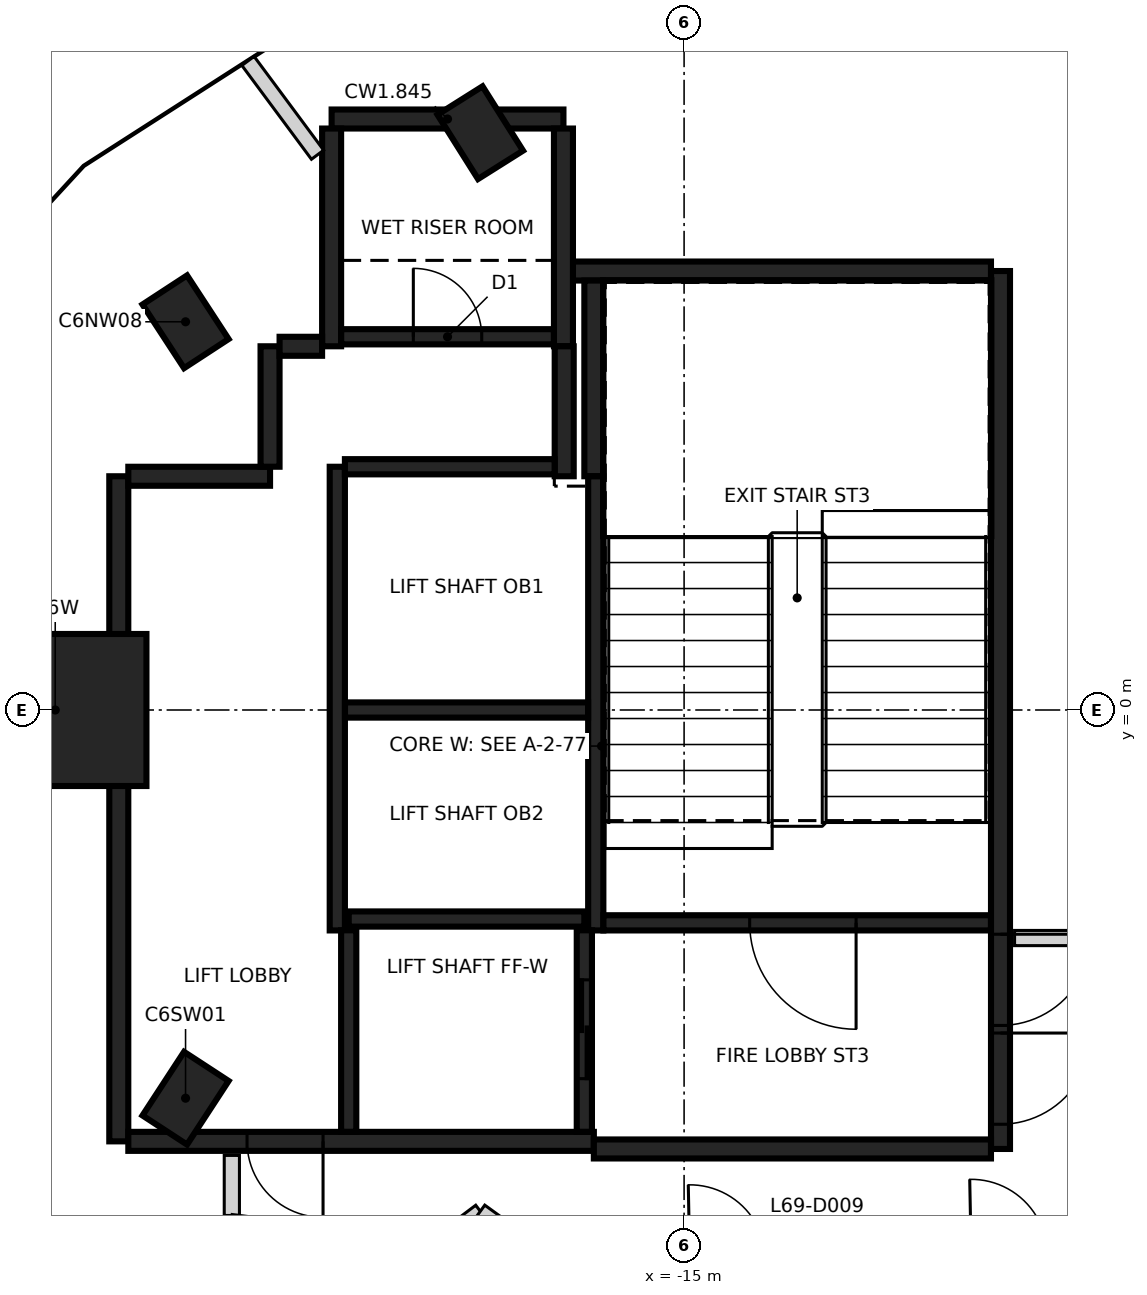
"""IFC4 building model, lengths in metres.
Left out: names, types, materials, properties, quantities, classifications, styles, units other than length and angle.
Written with IfcOpenShell. Run it as: python <this file> out.ifc"""

import sys

from ifc_helpers import new_model, si_unit, direction, frame, frame_2d, origin, origin_2d, place, context, subcontext, project, spatial, rectangle, extrude, element, fill, save


model = new_model("IFC4")
c1 = context("Model", 3, precision=1e-05, world=origin(), true_north=direction((0.0, 1.0)))
c2 = subcontext(c1, "Body", "Model", "MODEL_VIEW")
j1 = project(units=[si_unit("LENGTHUNIT", "METRE"), si_unit("PLANEANGLEUNIT", "RADIAN")], contexts=[c1])
p1 = place(None, origin())
s1 = spatial("IfcSite", under=j1, at=p1, CompositionType="ELEMENT")
p2 = place(p1, origin())
s2 = spatial("IfcBuilding", under=s1, at=p2, CompositionType="ELEMENT")
p3 = place(p2, frame((0.0, 0.0, 273.0)))
s3 = spatial("IfcBuildingStorey", under=s2, at=p3, CompositionType="ELEMENT", Elevation=273.0)
for number, where, z_axis, x_axis in (
    (1, (-17.681, 7.595, -0.35), (0.0, 0.0, 1.0), (-0.533, 0.846, 0.0)),
    (2, (-21.559, 5.107, -0.35), (0.0, 0.0, 1.0), (-0.547, 0.837, 0.0)),
    (3, (-21.559, -5.107, -0.35), (0.0, 0.0, 1.0), (0.547, 0.837, 0.0)),
):
    element("IfcColumn", number, at=place(p3, frame(where, z_axis=z_axis, x_axis=x_axis)), inside=s3, PredefinedType="COLUMN", context=c2, shape_type="SweptSolid", body=[
        extrude(rectangle(XDim=1.0, YDim=0.7, at=origin_2d()), origin(), (0.0, 0.0, 1.0), 3.6),
    ])
p4 = place(p3, frame((-23.273, 0.0, -0.35), z_axis=(0.0, 0.0, 1.0), x_axis=(1.0, 0.0, 0.0)))
e4 = element("IfcColumn", 4, at=p4, inside=s3, PredefinedType="COLUMN", context=c2, shape_type="SweptSolid", body=[
    extrude(rectangle(XDim=2.4, YDim=2.0, at=origin_2d()), origin(), (0.0, 0.0, 1.0), 3.6),
])
p5 = place(p3, frame((-10.837, 5.775, 0.0), z_axis=(0.0, 0.0, 1.0), x_axis=(0.0, -1.0, 0.0)))
e5 = element("IfcWall", 5, at=p5, inside=s3, PredefinedType="SHEAR", context=c2, shape_type="SweptSolid", body=[
    extrude(rectangle(XDim=11.55, YDim=0.25, at=frame_2d((5.775, 0.0))), origin(), (0.0, 0.0, 1.0), 3.25),
])
p6 = place(p5, frame((10.025, 0.0, 0.0)))
e6 = element("IfcOpeningElement", 6, at=p6, cuts=e5, PredefinedType="OPENING", context=c2, shape_type="SweptSolid", body=[
    extrude(rectangle(XDim=1.2, YDim=2.1, at=frame_2d((0.6, 1.05))), frame((0.0, 0.135, 0.0), z_axis=(0.0, -1.0, 0.0), x_axis=(1.0, 0.0, 0.0)), (0.0, 0.0, 1.0), 0.27),
])
p7 = place(p5, frame((8.725, 0.0, 0.0)))
e7 = element("IfcOpeningElement", 7, at=p7, cuts=e5, PredefinedType="OPENING", context=c2, shape_type="SweptSolid", body=[
    extrude(rectangle(XDim=1.2, YDim=2.1, at=frame_2d((0.6, 1.05))), frame((0.0, 0.135, 0.0), z_axis=(0.0, -1.0, 0.0), x_axis=(1.0, 0.0, 0.0)), (0.0, 0.0, 1.0), 0.27),
])
p8 = place(p3, frame((-22.437, -5.675, 0.0), z_axis=(0.0, 0.0, 1.0), x_axis=(0.0, 1.0, 0.0)))
e8 = element("IfcWall", 8, at=p8, inside=s3, PredefinedType="SHEAR", context=c2, shape_type="SweptSolid", body=[
    extrude(rectangle(XDim=8.75, YDim=0.25, at=frame_2d((4.375, 0.0))), origin(), (0.0, 0.0, 1.0), 3.25),
])
p9 = place(p3, frame((-16.187, -5.675, 0.0), z_axis=(0.0, 0.0, 1.0), x_axis=(-1.0, 0.0, 0.0)))
e9 = element("IfcWall", 9, at=p9, inside=s3, PredefinedType="SHEAR", context=c2, shape_type="SweptSolid", body=[
    extrude(rectangle(XDim=6.125, YDim=0.25, at=frame_2d((3.062, 0.0))), origin(), (0.0, 0.0, 1.0), 3.25),
])
p10 = place(p9, frame((3.563, 0.0, 0.0)))
e10 = element("IfcOpeningElement", 10, at=p10, cuts=e9, PredefinedType="OPENING", context=c2, shape_type="SweptSolid", body=[
    extrude(rectangle(XDim=1.0, YDim=2.1, at=frame_2d((0.5, 1.05))), frame((0.0, 0.135, 0.0), z_axis=(0.0, -1.0, 0.0), x_axis=(1.0, 0.0, 0.0)), (0.0, 0.0, 1.0), 0.27),
])
p11 = place(p3, frame((-10.963, -5.775, 0.0), z_axis=(0.0, 0.0, 1.0), x_axis=(-1.0, 0.0, 0.0)))
e11 = element("IfcWall", 11, at=p11, inside=s3, PredefinedType="SHEAR", context=c2, shape_type="SweptSolid", body=[
    extrude(rectangle(XDim=5.225, YDim=0.25, at=frame_2d((2.612, 0.0))), origin(), (0.0, 0.0, 1.0), 3.25),
])
p12 = place(p3, frame((-16.472, 5.775, 0.0), z_axis=(0.0, 0.0, 1.0), x_axis=(1.0, 0.0, 0.0)))
e12 = element("IfcWall", 12, at=p12, inside=s3, PredefinedType="SHEAR", context=c2, shape_type="SweptSolid", body=[
    extrude(rectangle(XDim=5.51, YDim=0.25, at=frame_2d((2.755, 0.0))), origin(), (0.0, 0.0, 1.0), 3.25),
])
p13 = place(p3, frame((-19.637, 7.775, 0.0), z_axis=(0.0, 0.0, 1.0), x_axis=(1.0, 0.0, 0.0)))
e13 = element("IfcWall", 13, at=p13, inside=s3, PredefinedType="SHEAR", context=c2, shape_type="SweptSolid", body=[
    extrude(rectangle(XDim=3.05, YDim=0.25, at=frame_2d((1.525, 0.0))), origin(), (0.0, 0.0, 1.0), 3.25),
])
for number, where, z_axis, x_axis in (
    (14, (-16.587, 7.65, 0.0), (0.0, 0.0, 1.0), (0.0, -1.0, 0.0)),
    (15, (-19.637, 4.785, 0.0), (0.0, 0.0, 1.0), (0.0, 1.0, 0.0)),
):
    element("IfcWall", number, at=place(p3, frame(where, z_axis=z_axis, x_axis=x_axis)), inside=s3, PredefinedType="SHEAR", context=c2, shape_type="SweptSolid", body=[
        extrude(rectangle(XDim=2.865, YDim=0.25, at=frame_2d((1.432, 0.0))), origin(), (0.0, 0.0, 1.0), 3.25),
    ])
p14 = place(p3, frame((-16.187, 3.075, 0.0), z_axis=(0.0, 0.0, 1.0), x_axis=(0.0, 1.0, 0.0)))
e16 = element("IfcWall", 16, at=p14, inside=s3, PredefinedType="SHEAR", context=c2, shape_type="SweptSolid", body=[
    extrude(rectangle(XDim=2.575, YDim=0.25, at=frame_2d((1.287, 0.0))), origin(), (0.0, 0.0, 1.0), 3.25),
])
p15 = place(p3, frame((-22.312, 3.075, 0.0), z_axis=(0.0, 0.0, 1.0), x_axis=(1.0, 0.0, 0.0)))
e17 = element("IfcWall", 17, at=p15, inside=s3, PredefinedType="SHEAR", context=c2, shape_type="SweptSolid", body=[
    extrude(rectangle(XDim=1.865, YDim=0.25, at=frame_2d((0.932, 0.0))), origin(), (0.0, 0.0, 1.0), 3.25),
])
p16 = place(p3, frame((-16.577, 4.785, 0.0), z_axis=(0.0, 0.0, 1.0), x_axis=(0.0, -1.0, 0.0)))
e18 = element("IfcWall", 18, at=p16, inside=s3, PredefinedType="SHEAR", context=c2, shape_type="SweptSolid", body=[
    extrude(rectangle(XDim=1.71, YDim=0.25, at=frame_2d((0.855, 0.0))), origin(), (0.0, 0.0, 1.0), 3.25),
])
p17 = place(p3, frame((-20.447, 3.2, 0.0), z_axis=(0.0, 0.0, 1.0), x_axis=(0.0, 1.0, 0.0)))
e19 = element("IfcWall", 19, at=p17, inside=s3, PredefinedType="SHEAR", context=c2, shape_type="SweptSolid", body=[
    extrude(rectangle(XDim=1.584, YDim=0.25, at=frame_2d((0.792, 0.0))), origin(), (0.0, 0.0, 1.0), 3.25),
])
p18 = place(p3, frame((-20.322, 4.785, 0.0), z_axis=(0.0, 0.0, 1.0), x_axis=(1.0, 0.0, 0.0)))
e20 = element("IfcWall", 20, at=p18, inside=s3, PredefinedType="SHEAR", context=c2, shape_type="SweptSolid", body=[
    extrude(rectangle(XDim=0.559, YDim=0.25, at=frame_2d((0.28, 0.0))), origin(), (0.0, 0.0, 1.0), 3.25),
])
p19 = place(p3, frame((-16.162, 3.074, 0.0), z_axis=(0.0, 0.0, 1.0), x_axis=(0.0, -1.0, 0.0)))
e21 = element("IfcWall", 21, at=p19, inside=s3, PredefinedType="SHEAR", context=c2, shape_type="SweptSolid", body=[
    extrude(rectangle(XDim=5.974, YDim=0.2, at=frame_2d((2.987, 0.0))), origin(), (0.0, 0.0, 1.0), 3.25),
])
p20 = place(p3, frame((-19.562, -2.9, 0.0), z_axis=(0.0, 0.0, 1.0), x_axis=(0.0, 1.0, 0.0)))
e22 = element("IfcWall", 22, at=p20, inside=s3, PredefinedType="SHEAR", context=c2, shape_type="SweptSolid", body=[
    extrude(rectangle(XDim=6.1, YDim=0.2, at=frame_2d((3.05, 0.0))), origin(), (0.0, 0.0, 1.0), 3.25),
])
p21 = place(p3, frame((-10.963, -2.8, 0.0), z_axis=(0.0, 0.0, 1.0), x_axis=(-1.0, 0.0, 0.0)))
e23 = element("IfcWall", 23, at=p21, inside=s3, PredefinedType="SHEAR", context=c2, shape_type="SweptSolid", body=[
    extrude(rectangle(XDim=5.098, YDim=0.2, at=frame_2d((2.549, 0.0))), origin(), (0.0, 0.0, 1.0), 3.25),
])
p22 = place(p21, frame((1.774, 0.0, 0.0)))
e24 = element("IfcOpeningElement", 24, at=p22, cuts=e23, PredefinedType="OPENING", context=c2, shape_type="SweptSolid", body=[
    extrude(rectangle(XDim=1.4, YDim=2.1, at=frame_2d((0.7, 1.05))), frame((0.0, 0.11, 0.0), z_axis=(0.0, -1.0, 0.0), x_axis=(1.0, 0.0, 0.0)), (0.0, 0.0, 1.0), 0.22),
])
p23 = place(p3, frame((-16.263, 0.0, 0.0), z_axis=(0.0, 0.0, 1.0), x_axis=(-1.0, 0.0, 0.0)))
e25 = element("IfcWall", 25, at=p23, inside=s3, PredefinedType="SHEAR", context=c2, shape_type="SweptSolid", body=[
    extrude(rectangle(XDim=3.198, YDim=0.2, at=frame_2d((1.599, 0.0))), origin(), (0.0, 0.0, 1.0), 3.25),
])
p24 = place(p3, frame((-19.511, 4.91, 0.0), z_axis=(0.0, 0.0, 1.0), x_axis=(1.0, 0.0, 0.0)))
e26 = element("IfcWall", 26, at=p24, inside=s3, PredefinedType="SHEAR", context=c2, shape_type="SweptSolid", body=[
    extrude(rectangle(XDim=2.798, YDim=0.2, at=frame_2d((1.399, 0.0))), origin(), (0.0, 0.0, 1.0), 3.25),
])
p25 = place(p24, frame((0.949, 0.0, 0.0)))
e27 = element("IfcOpeningElement", 27, at=p25, cuts=e26, PredefinedType="OPENING", context=c2, shape_type="SweptSolid", body=[
    extrude(rectangle(XDim=0.9, YDim=2.1, at=frame_2d((0.45, 1.05))), frame((0.0, 0.11, 0.0), z_axis=(0.0, -1.0, 0.0), x_axis=(1.0, 0.0, 0.0)), (0.0, 0.0, 1.0), 0.22),
])
p26 = place(p3, frame((-19.462, 3.2, 0.0), z_axis=(0.0, 0.0, 1.0), x_axis=(1.0, 0.0, 0.0)))
e28 = element("IfcWall", 28, at=p26, inside=s3, PredefinedType="SHEAR", context=c2, shape_type="SweptSolid", body=[
    extrude(rectangle(XDim=2.759, YDim=0.2, at=frame_2d((1.379, 0.0))), origin(), (0.0, 0.0, 1.0), 3.25),
])
p27 = place(p3, frame((-19.412, -2.75, 0.0), z_axis=(0.0, 0.0, 1.0), x_axis=(1.0, 0.0, 0.0)))
e29 = element("IfcWall", 29, at=p27, inside=s3, PredefinedType="SHEAR", context=c2, shape_type="SweptSolid", body=[
    extrude(rectangle(XDim=3.1, YDim=0.2, at=frame_2d((1.55, 0.0))), origin(), (0.0, 0.0, 1.0), 3.25),
])
p28 = place(p3, frame((-16.312, -2.898, 0.0), z_axis=(0.0, 0.0, 1.0), x_axis=(0.0, -1.0, 0.0)))
e30 = element("IfcWall", 30, at=p28, inside=s3, PredefinedType="SHEAR", context=c2, shape_type="SweptSolid", body=[
    extrude(rectangle(XDim=2.651, YDim=0.2, at=frame_2d((1.325, 0.0))), origin(), (0.0, 0.0, 1.0), 3.25),
])
p29 = place(p28, frame((0.652, 0.0, 0.0)))
e31 = element("IfcOpeningElement", 31, at=p29, cuts=e30, PredefinedType="OPENING", context=c2, shape_type="SweptSolid", body=[
    extrude(rectangle(XDim=1.3, YDim=2.1, at=frame_2d((0.65, 1.05))), frame((0.0, 0.11, 0.0), z_axis=(0.0, -1.0, 0.0), x_axis=(1.0, 0.0, 0.0)), (0.0, 0.0, 1.0), 0.22),
])
p30 = place(p3, frame((-19.412, -5.549, 0.0), z_axis=(0.0, 0.0, 1.0), x_axis=(0.0, 1.0, 0.0)))
e32 = element("IfcWall", 32, at=p30, inside=s3, PredefinedType="SHEAR", context=c2, shape_type="SweptSolid", body=[
    extrude(rectangle(XDim=2.651, YDim=0.2, at=frame_2d((1.325, 0.0))), origin(), (0.0, 0.0, 1.0), 3.25),
])
p31 = place(p3, frame((-20.95, -6.65, 0.0), z_axis=(0.0, 0.0, 1.0), x_axis=(0.0, 1.0, 0.0)))
e33 = element("IfcWall", 33, at=p31, inside=s3, PredefinedType="PARTITIONING", context=c2, shape_type="SweptSolid", body=[
    extrude(rectangle(XDim=0.79, YDim=0.2, at=frame_2d((0.395, 0.0))), origin(), (0.0, 0.0, 1.0), 3.25),
])
p32 = place(p3, frame((-20.936, -7.363, 0.0), z_axis=(0.0, 0.0, 1.0), x_axis=(0.125330520795, 0.992115044013, 0.0)))
e34 = element("IfcWall", 34, at=p32, inside=s3, PredefinedType="PARTITIONING", context=c2, shape_type="SweptSolid", body=[
    extrude(rectangle(XDim=0.719, YDim=0.2, at=frame_2d((0.359, 0.0))), origin(), (0.0, 0.0, 1.0), 3.25),
])
p33 = place(p3, frame((-18.642, -7.319, 0.0), z_axis=(0.0, 0.0, 1.0), x_axis=(0.798707882989, 0.601718968998, 0.0)))
e35 = element("IfcWall", 35, at=p33, inside=s3, PredefinedType="PARTITIONING", context=c2, shape_type="SweptSolid", body=[
    extrude(rectangle(XDim=1.203, YDim=0.2, at=frame_2d((0.602, 0.0))), origin(), (0.0, 0.0, 1.0), 2.35),
])
p34 = place(p3, frame((-17.681, -6.595, 0.0), z_axis=(0.0, 0.0, 1.0), x_axis=(0.810123213102, -0.586259652026, 0.0)))
e36 = element("IfcWall", 36, at=p34, inside=s3, PredefinedType="PARTITIONING", context=c2, shape_type="SweptSolid", body=[
    extrude(rectangle(XDim=1.17, YDim=0.2, at=frame_2d((0.585, 0.0))), origin(), (0.0, 0.0, 1.0), 3.25),
])
p35 = place(p3, frame((-10.652, -3.0, 0.0), z_axis=(0.0, 0.0, 1.0), x_axis=(1.0, 0.0, 0.0)))
e37 = element("IfcWall", 37, at=p35, inside=s3, PredefinedType="PARTITIONING", context=c2, shape_type="SweptSolid", body=[
    extrude(rectangle(XDim=0.994, YDim=0.2, at=frame_2d((0.497, 0.0))), origin(), (0.0, 0.0, 1.0), 3.25),
])
p36 = place(p3, frame((-10.023, -7.151, 0.0), z_axis=(0.0, 0.0, 1.0), x_axis=(0.668804583793, 0.743438248073, 0.0)))
e38 = element("IfcWall", 38, at=p36, inside=s3, PredefinedType="PARTITIONING", context=c2, shape_type="SweptSolid", body=[
    extrude(rectangle(XDim=2.021, YDim=0.2, at=frame_2d((1.011, 0.0))), origin(), (0.0, 0.0, 1.0), 3.25),
])
p37 = place(p3, frame((-20.738, 8.539, 0.0), z_axis=(0.0, 0.0, 1.0), x_axis=(0.595694844153, -0.803210839475, 0.0)))
e39 = element("IfcWall", 39, at=p37, inside=s3, PredefinedType="PARTITIONING", context=c2, shape_type="SweptSolid", body=[
    extrude(rectangle(XDim=1.536, YDim=0.2, at=frame_2d((0.768, 0.0))), origin(), (0.0, 0.0, 1.0), 3.25),
])
p38 = place(p3, frame((-11.035, 14.505, 0.0), z_axis=(0.0, 0.0, 1.0), x_axis=(0.499989597041, -0.866031409852, 0.0)))
e40 = element("IfcWall", 40, at=p38, inside=s3, PredefinedType="PARTITIONING", context=c2, shape_type="SweptSolid", body=[
    extrude(rectangle(XDim=13.079, YDim=0.2, at=frame_2d((6.54, 0.0))), origin(), (0.0, 0.0, 1.0), 3.25),
])
p39 = place(p29, origin())
e41 = element("IfcDoor", 41, at=p39, inside=s3, OperationType="SLIDING_TO_RIGHT", PredefinedType="DOOR", context=c2, shape_type="SweptSolid", body=[
    extrude(rectangle(XDim=1.3, YDim=2.1, at=frame_2d((0.65, 1.05))), frame((0.0, 0.025, 0.0), z_axis=(0.0, -1.0, 0.0), x_axis=(1.0, 0.0, 0.0)), (0.0, 0.0, 1.0), 0.05),
])
fill(e31, e41)
p40 = place(p10, origin())
e42 = element("IfcDoor", 42, at=p40, inside=s3, OperationType="SINGLE_SWING_LEFT", PredefinedType="DOOR", context=c2, shape_type="SweptSolid", body=[
    extrude(rectangle(XDim=1.0, YDim=2.1, at=frame_2d((0.5, 1.05))), frame((0.0, 0.025, 0.0), z_axis=(0.0, -1.0, 0.0), x_axis=(1.0, 0.0, 0.0)), (0.0, 0.0, 1.0), 0.05),
])
fill(e10, e42)
p41 = place(p6, origin())
e43 = element("IfcDoor", 43, at=p41, inside=s3, OperationType="SINGLE_SWING_LEFT", PredefinedType="DOOR", context=c2, shape_type="SweptSolid", body=[
    extrude(rectangle(XDim=1.2, YDim=2.1, at=frame_2d((0.6, 1.05))), frame((0.0, 0.025, 0.0), z_axis=(0.0, -1.0, 0.0), x_axis=(1.0, 0.0, 0.0)), (0.0, 0.0, 1.0), 0.05),
])
fill(e6, e43)
p42 = place(p7, origin())
e44 = element("IfcDoor", 44, at=p42, inside=s3, OperationType="SINGLE_SWING_RIGHT", PredefinedType="DOOR", context=c2, shape_type="SweptSolid", body=[
    extrude(rectangle(XDim=1.2, YDim=2.1, at=frame_2d((0.6, 1.05))), frame((0.0, 0.025, 0.0), z_axis=(0.0, -1.0, 0.0), x_axis=(1.0, 0.0, 0.0)), (0.0, 0.0, 1.0), 0.05),
])
fill(e7, e44)
p43 = place(p22, origin())
e45 = element("IfcDoor", 45, at=p43, inside=s3, OperationType="SINGLE_SWING_RIGHT", PredefinedType="DOOR", context=c2, shape_type="SweptSolid", body=[
    extrude(rectangle(XDim=1.4, YDim=2.1, at=frame_2d((0.7, 1.05))), frame((0.0, 0.025, 0.0), z_axis=(0.0, -1.0, 0.0), x_axis=(1.0, 0.0, 0.0)), (0.0, 0.0, 1.0), 0.05),
])
fill(e24, e45)
p44 = place(p25, origin())
e46 = element("IfcDoor", 46, at=p44, inside=s3, OperationType="SINGLE_SWING_LEFT", PredefinedType="DOOR", context=c2, shape_type="SweptSolid", body=[
    extrude(rectangle(XDim=0.9, YDim=2.1, at=frame_2d((0.45, 1.05))), frame((0.0, 0.025, 0.0), z_axis=(0.0, -1.0, 0.0), x_axis=(1.0, 0.0, 0.0)), (0.0, 0.0, 1.0), 0.05),
])
fill(e27, e46)
save(model, sys.argv[1])
